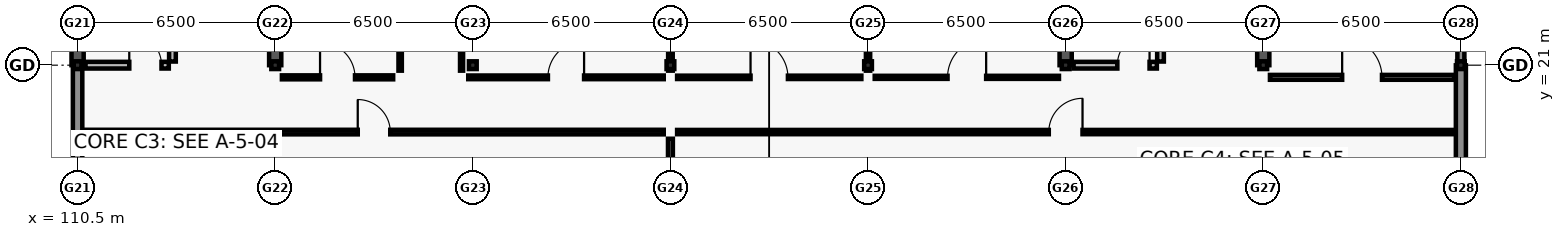
"""IFC4 building model, lengths in metres.
Left out: names, types, materials, properties, quantities, classifications, styles, units other than length and angle.
Written with IfcOpenShell. Run it as: python <this file> out.ifc"""

import sys

from ifc_helpers import new_model, si_unit, direction, frame, frame_2d, origin, origin_2d, place, context, subcontext, project, spatial, rectangle, i_section, extrude, element, fill, save


model = new_model("IFC4")
c1 = context("Model", 3, precision=1e-05, world=origin(), true_north=direction((0.0, 1.0)))
c2 = subcontext(c1, "Body", "Model", "MODEL_VIEW")
j1 = project(units=[si_unit("LENGTHUNIT", "METRE"), si_unit("PLANEANGLEUNIT", "RADIAN")], contexts=[c1])
p1 = place(None, origin())
s1 = spatial("IfcSite", under=j1, at=p1, CompositionType="ELEMENT")
p2 = place(p1, origin())
s2 = spatial("IfcBuilding", under=s1, at=p2, CompositionType="ELEMENT")
p3 = place(p2, frame((0.0, 0.0, 21.3)))
s3 = spatial("IfcBuildingStorey", under=s2, at=p3, CompositionType="ELEMENT", Elevation=21.3)
for number, where, z_axis, x_axis in (
    (1, (110.5, 21.0, 0.0), (0.0, 0.0, 1.0), (1.0, 0.0, 0.0)),
    (2, (117.0, 21.0, 0.0), (0.0, 0.0, 1.0), (1.0, 0.0, 0.0)),
    (3, (123.5, 21.0, 0.0), (0.0, 0.0, 1.0), (1.0, 0.0, 0.0)),
    (4, (130.0, 21.0, 0.0), (0.0, 0.0, 1.0), (1.0, 0.0, 0.0)),
    (5, (136.5, 21.0, 0.0), (0.0, 0.0, 1.0), (1.0, 0.0, 0.0)),
    (6, (143.0, 21.0, 0.0), (0.0, 0.0, 1.0), (1.0, 0.0, 0.0)),
    (7, (149.5, 21.0, 0.0), (0.0, 0.0, 1.0), (1.0, 0.0, 0.0)),
    (8, (156.0, 21.0, 0.0), (0.0, 0.0, 1.0), (1.0, 0.0, 0.0)),
):
    element("IfcColumn", number, at=place(p3, frame(where, z_axis=z_axis, x_axis=x_axis)), inside=s3, PredefinedType="COLUMN", context=c2, shape_type="SweptSolid", body=[
        extrude(i_section(OverallWidth=0.254, OverallDepth=0.254, WebThickness=0.009, FlangeThickness=0.014, FilletRadius=0.013, at=origin_2d()), origin(), (0.0, 0.0, 1.0), 3.9),
    ])
for number, where, z_axis, x_axis in (
    (9, (110.5, 21.0, 0.0), (0.0, 0.0, 1.0), (0.0, 1.0, 0.0)),
    (10, (117.0, 21.0, 0.0), (0.0, 0.0, 1.0), (0.0, 1.0, 0.0)),
    (11, (143.0, 21.0, 0.0), (0.0, 0.0, 1.0), (0.0, 1.0, 0.0)),
    (12, (149.5, 21.0, 0.0), (0.0, 0.0, 1.0), (0.0, 1.0, 0.0)),
):
    element("IfcWall", number, at=place(p3, frame(where, z_axis=z_axis, x_axis=x_axis)), inside=s3, PredefinedType="SHEAR", context=c2, shape_type="SweptSolid", body=[
        extrude(rectangle(XDim=6.4, YDim=0.4, at=frame_2d((3.2, 0.0))), origin(), (0.0, 0.0, 1.0), 3.66),
    ])
p4 = place(p3, frame((110.5, 14.405, 0.0), z_axis=(0.0, 0.0, 1.0), x_axis=(0.0, 1.0, 0.0)))
e13 = element("IfcWall", 13, at=p4, inside=s3, PredefinedType="SOLIDWALL", context=c2, shape_type="SweptSolid", body=[
    extrude(rectangle(XDim=6.59, YDim=0.31, at=frame_2d((3.295, 0.0))), origin(), (0.0, 0.0, 1.0), 3.02),
])
p5 = place(p4, frame((0.988, 0.0, 0.8)))
e14 = element("IfcOpeningElement", 14, at=p5, cuts=e13, PredefinedType="OPENING", context=c2, shape_type="SweptSolid", body=[
    extrude(rectangle(XDim=2.45, YDim=1.95, at=frame_2d((1.225, 0.975))), frame((0.0, 0.165, 0.0), z_axis=(0.0, -1.0, 0.0), x_axis=(1.0, 0.0, 0.0)), (0.0, 0.0, 1.0), 0.33),
])
p6 = place(p3, frame((156.0, 20.995, 0.0), z_axis=(0.0, 0.0, 1.0), x_axis=(0.0, -1.0, 0.0)))
e15 = element("IfcWall", 15, at=p6, inside=s3, PredefinedType="SOLIDWALL", context=c2, shape_type="SweptSolid", body=[
    extrude(rectangle(XDim=6.59, YDim=0.33, at=frame_2d((3.295, 0.0))), origin(), (0.0, 0.0, 1.0), 3.02),
])
p7 = place(p6, frame((3.177, 0.0, 0.72)))
e16 = element("IfcOpeningElement", 16, at=p7, cuts=e15, PredefinedType="OPENING", context=c2, shape_type="SweptSolid", body=[
    extrude(rectangle(XDim=2.4, YDim=2.1, at=frame_2d((1.2, 1.05))), frame((0.0, 0.175, 0.0), z_axis=(0.0, -1.0, 0.0), x_axis=(1.0, 0.0, 0.0)), (0.0, 0.0, 1.0), 0.35),
])
p8 = place(p3, frame((156.0, 27.595, 0.0), z_axis=(0.0, 0.0, 1.0), x_axis=(0.0, -1.0, 0.0)))
e17 = element("IfcWall", 17, at=p8, inside=s3, PredefinedType="SOLIDWALL", context=c2, shape_type="SweptSolid", body=[
    extrude(rectangle(XDim=6.59, YDim=0.23, at=frame_2d((3.295, 0.0))), origin(), (0.0, 0.0, 1.0), 3.02),
])
p9 = place(p8, frame((2.02, 0.0, 0.72)))
e18 = element("IfcOpeningElement", 18, at=p9, cuts=e17, PredefinedType="OPENING", context=c2, shape_type="SweptSolid", body=[
    extrude(rectangle(XDim=2.55, YDim=2.1, at=frame_2d((1.275, 1.05))), frame((0.0, 0.125, 0.0), z_axis=(0.0, -1.0, 0.0), x_axis=(1.0, 0.0, 0.0)), (0.0, 0.0, 1.0), 0.25),
])
p10 = place(p3, frame((113.62, 21.12, 0.0), z_axis=(0.0, 0.0, 1.0), x_axis=(0.0, 1.0, 0.0)))
e19 = element("IfcWall", 19, at=p10, inside=s3, PredefinedType="SOLIDWALL", context=c2, shape_type="SweptSolid", body=[
    extrude(rectangle(XDim=6.255, YDim=0.22, at=frame_2d((3.127, 0.0))), origin(), (0.0, 0.0, 1.0), 3.02),
])
p11 = place(p3, frame((110.76, 21.0, 0.0), z_axis=(0.0, 0.0, 1.0), x_axis=(1.0, 0.0, 0.0)))
e20 = element("IfcWall", 20, at=p11, inside=s3, PredefinedType="SOLIDWALL", context=c2, shape_type="SweptSolid", body=[
    extrude(rectangle(XDim=2.74, YDim=0.22, at=frame_2d((1.37, 0.0))), origin(), (0.0, 0.0, 1.0), 3.02),
])
p12 = place(p11, frame((1.44, 0.0, 0.0)))
e21 = element("IfcOpeningElement", 21, at=p12, cuts=e20, PredefinedType="OPENING", context=c2, shape_type="SweptSolid", body=[
    extrude(rectangle(XDim=1.06, YDim=2.1, at=frame_2d((0.53, 1.05))), frame((0.0, 0.12, 0.0), z_axis=(0.0, -1.0, 0.0), x_axis=(1.0, 0.0, 0.0)), (0.0, 0.0, 1.0), 0.24),
])
p13 = place(p3, frame((146.12, 21.12, 0.0), z_axis=(0.0, 0.0, 1.0), x_axis=(0.0, 1.0, 0.0)))
e22 = element("IfcWall", 22, at=p13, inside=s3, PredefinedType="SOLIDWALL", context=c2, shape_type="SweptSolid", body=[
    extrude(rectangle(XDim=6.255, YDim=0.22, at=frame_2d((3.127, 0.0))), origin(), (0.0, 0.0, 1.0), 3.02),
])
p14 = place(p3, frame((143.26, 21.0, 0.0), z_axis=(0.0, 0.0, 1.0), x_axis=(1.0, 0.0, 0.0)))
e23 = element("IfcWall", 23, at=p14, inside=s3, PredefinedType="SOLIDWALL", context=c2, shape_type="SweptSolid", body=[
    extrude(rectangle(XDim=2.74, YDim=0.22, at=frame_2d((1.37, 0.0))), origin(), (0.0, 0.0, 1.0), 3.02),
])
p15 = place(p14, frame((1.44, 0.0, 0.0)))
e24 = element("IfcOpeningElement", 24, at=p15, cuts=e23, PredefinedType="OPENING", context=c2, shape_type="SweptSolid", body=[
    extrude(rectangle(XDim=1.06, YDim=2.1, at=frame_2d((0.53, 1.05))), frame((0.0, 0.12, 0.0), z_axis=(0.0, -1.0, 0.0), x_axis=(1.0, 0.0, 0.0)), (0.0, 0.0, 1.0), 0.24),
])
p16 = place(p3, frame((121.11, 20.82, 0.0), z_axis=(0.0, 0.0, 1.0), x_axis=(0.0, 1.0, 0.0)))
e25 = element("IfcWall", 25, at=p16, inside=s3, PredefinedType="PARTITIONING", context=c2, shape_type="SweptSolid", body=[
    extrude(rectangle(XDim=3.16, YDim=0.11, at=frame_2d((1.58, 0.0))), origin(), (0.0, 0.0, 1.0), 3.0),
])
p17 = place(p16, frame((1.08, 0.0, 0.0)))
e26 = element("IfcOpeningElement", 26, at=p17, cuts=e25, PredefinedType="OPENING", context=c2, shape_type="SweptSolid", body=[
    extrude(rectangle(XDim=1.0, YDim=2.12, at=frame_2d((0.5, 1.06))), frame((0.0, 0.065, 0.0), z_axis=(0.0, -1.0, 0.0), x_axis=(1.0, 0.0, 0.0)), (0.0, 0.0, 1.0), 0.13),
])
p18 = place(p3, frame((123.13, 20.82, 0.0), z_axis=(0.0, 0.0, 1.0), x_axis=(0.0, 1.0, 0.0)))
e27 = element("IfcWall", 27, at=p18, inside=s3, PredefinedType="PARTITIONING", context=c2, shape_type="SweptSolid", body=[
    extrude(rectangle(XDim=3.16, YDim=0.1, at=frame_2d((1.58, 0.0))), origin(), (0.0, 0.0, 1.0), 3.0),
])
p19 = place(p18, frame((1.065, 0.0, 0.0)))
e28 = element("IfcOpeningElement", 28, at=p19, cuts=e27, PredefinedType="OPENING", context=c2, shape_type="SweptSolid", body=[
    extrude(rectangle(XDim=1.03, YDim=2.06, at=frame_2d((0.515, 1.03))), frame((0.0, 0.06, 0.0), z_axis=(0.0, -1.0, 0.0), x_axis=(1.0, 0.0, 0.0)), (0.0, 0.0, 1.0), 0.12),
])
p20 = place(p3, frame((130.0, 14.62, 0.0), z_axis=(0.0, 0.0, 1.0), x_axis=(0.0, 1.0, 0.0)))
e29 = element("IfcWall", 29, at=p20, inside=s3, PredefinedType="PARTITIONING", context=c2, shape_type="SweptSolid", body=[
    extrude(rectangle(XDim=3.96, YDim=0.16, at=frame_2d((1.98, 0.0))), origin(), (0.0, 0.0, 1.0), 3.0),
])
p21 = place(p3, frame((110.72, 18.8, 0.0), z_axis=(0.0, 0.0, 1.0), x_axis=(1.0, 0.0, 0.0)))
e30 = element("IfcWall", 30, at=p21, inside=s3, PredefinedType="PARTITIONING", context=c2, shape_type="SweptSolid", body=[
    extrude(rectangle(XDim=19.06, YDim=0.15, at=frame_2d((9.53, 0.0))), origin(), (0.0, 0.0, 1.0), 3.0),
])
p22 = place(p21, frame((8.995, 0.0, 0.0)))
e31 = element("IfcOpeningElement", 31, at=p22, cuts=e30, PredefinedType="OPENING", context=c2, shape_type="SweptSolid", body=[
    extrude(rectangle(XDim=1.07, YDim=2.08, at=frame_2d((0.535, 1.04))), frame((0.0, 0.085, 0.0), z_axis=(0.0, -1.0, 0.0), x_axis=(1.0, 0.0, 0.0)), (0.0, 0.0, 1.0), 0.17),
])
p23 = place(p3, frame((130.22, 18.8, 0.0), z_axis=(0.0, 0.0, 1.0), x_axis=(1.0, 0.0, 0.0)))
e32 = element("IfcWall", 32, at=p23, inside=s3, PredefinedType="PARTITIONING", context=c2, shape_type="SweptSolid", body=[
    extrude(rectangle(XDim=25.56, YDim=0.14, at=frame_2d((12.78, 0.0))), origin(), (0.0, 0.0, 1.0), 3.0),
])
p24 = place(p23, frame((12.225, 0.0, 0.0)))
e33 = element("IfcOpeningElement", 33, at=p24, cuts=e32, PredefinedType="OPENING", context=c2, shape_type="SweptSolid", body=[
    extrude(rectangle(XDim=1.11, YDim=2.1, at=frame_2d((0.555, 1.05))), frame((0.0, 0.08, 0.0), z_axis=(0.0, -1.0, 0.0), x_axis=(1.0, 0.0, 0.0)), (0.0, 0.0, 1.0), 0.16),
])
p25 = place(p3, frame((117.22, 20.6, 0.0), z_axis=(0.0, 0.0, 1.0), x_axis=(1.0, 0.0, 0.0)))
e34 = element("IfcWall", 34, at=p25, inside=s3, PredefinedType="PARTITIONING", context=c2, shape_type="SweptSolid", body=[
    extrude(rectangle(XDim=3.66, YDim=0.13, at=frame_2d((1.83, 0.0))), origin(), (0.0, 0.0, 1.0), 3.0),
])
p26 = place(p25, frame((1.255, 0.0, 0.0)))
e35 = element("IfcOpeningElement", 35, at=p26, cuts=e34, PredefinedType="OPENING", context=c2, shape_type="SweptSolid", body=[
    extrude(rectangle(XDim=1.15, YDim=2.12, at=frame_2d((0.575, 1.06))), frame((0.0, 0.075, 0.0), z_axis=(0.0, -1.0, 0.0), x_axis=(1.0, 0.0, 0.0)), (0.0, 0.0, 1.0), 0.15),
])
p27 = place(p3, frame((123.35, 20.6, 0.0), z_axis=(0.0, 0.0, 1.0), x_axis=(1.0, 0.0, 0.0)))
e36 = element("IfcWall", 36, at=p27, inside=s3, PredefinedType="PARTITIONING", context=c2, shape_type="SweptSolid", body=[
    extrude(rectangle(XDim=6.43, YDim=0.12, at=frame_2d((3.215, 0.0))), origin(), (0.0, 0.0, 1.0), 3.0),
])
p28 = place(p27, frame((2.62, 0.0, 0.0)))
e37 = element("IfcOpeningElement", 37, at=p28, cuts=e36, PredefinedType="OPENING", context=c2, shape_type="SweptSolid", body=[
    extrude(rectangle(XDim=1.19, YDim=2.14, at=frame_2d((0.595, 1.07))), frame((0.0, 0.07, 0.0), z_axis=(0.0, -1.0, 0.0), x_axis=(1.0, 0.0, 0.0)), (0.0, 0.0, 1.0), 0.14),
])
p29 = place(p3, frame((130.22, 20.6, 0.0), z_axis=(0.0, 0.0, 1.0), x_axis=(1.0, 0.0, 0.0)))
e38 = element("IfcWall", 38, at=p29, inside=s3, PredefinedType="PARTITIONING", context=c2, shape_type="SweptSolid", body=[
    extrude(rectangle(XDim=6.06, YDim=0.11, at=frame_2d((3.03, 0.0))), origin(), (0.0, 0.0, 1.0), 3.0),
])
p30 = place(p29, frame((2.415, 0.0, 0.0)))
e39 = element("IfcOpeningElement", 39, at=p30, cuts=e38, PredefinedType="OPENING", context=c2, shape_type="SweptSolid", body=[
    extrude(rectangle(XDim=1.23, YDim=2.08, at=frame_2d((0.615, 1.04))), frame((0.0, 0.065, 0.0), z_axis=(0.0, -1.0, 0.0), x_axis=(1.0, 0.0, 0.0)), (0.0, 0.0, 1.0), 0.13),
])
p31 = place(p3, frame((136.72, 20.6, 0.0), z_axis=(0.0, 0.0, 1.0), x_axis=(1.0, 0.0, 0.0)))
e40 = element("IfcWall", 40, at=p31, inside=s3, PredefinedType="PARTITIONING", context=c2, shape_type="SweptSolid", body=[
    extrude(rectangle(XDim=6.06, YDim=0.1, at=frame_2d((3.03, 0.0))), origin(), (0.0, 0.0, 1.0), 3.0),
])
p32 = place(p31, frame((2.395, 0.0, 0.0)))
e41 = element("IfcOpeningElement", 41, at=p32, cuts=e40, PredefinedType="OPENING", context=c2, shape_type="SweptSolid", body=[
    extrude(rectangle(XDim=1.27, YDim=2.1, at=frame_2d((0.635, 1.05))), frame((0.0, 0.06, 0.0), z_axis=(0.0, -1.0, 0.0), x_axis=(1.0, 0.0, 0.0)), (0.0, 0.0, 1.0), 0.12),
])
p33 = place(p3, frame((149.72, 20.6, 0.0), z_axis=(0.0, 0.0, 1.0), x_axis=(1.0, 0.0, 0.0)))
e42 = element("IfcWall", 42, at=p33, inside=s3, PredefinedType="PARTITIONING", context=c2, shape_type="SweptSolid", body=[
    extrude(rectangle(XDim=6.06, YDim=0.16, at=frame_2d((3.03, 0.0))), origin(), (0.0, 0.0, 1.0), 3.0),
])
p34 = place(p33, frame((2.375, 0.0, 0.0)))
e43 = element("IfcOpeningElement", 43, at=p34, cuts=e42, PredefinedType="OPENING", context=c2, shape_type="SweptSolid", body=[
    extrude(rectangle(XDim=1.31, YDim=2.14, at=frame_2d((0.655, 1.07))), frame((0.0, 0.09, 0.0), z_axis=(0.0, -1.0, 0.0), x_axis=(1.0, 0.0, 0.0)), (0.0, 0.0, 1.0), 0.18),
])
p35 = place(p3, frame((130.0, 20.82, 0.0), z_axis=(0.0, 0.0, 1.0), x_axis=(0.0, 1.0, 0.0)))
e44 = element("IfcWall", 44, at=p35, inside=s3, PredefinedType="PARTITIONING", context=c2, shape_type="SweptSolid", body=[
    extrude(rectangle(XDim=6.56, YDim=0.15, at=frame_2d((3.28, 0.0))), origin(), (0.0, 0.0, 1.0), 3.0),
])
p36 = place(p3, frame((136.5, 20.82, 0.0), z_axis=(0.0, 0.0, 1.0), x_axis=(0.0, 1.0, 0.0)))
e45 = element("IfcWall", 45, at=p36, inside=s3, PredefinedType="PARTITIONING", context=c2, shape_type="SweptSolid", body=[
    extrude(rectangle(XDim=6.56, YDim=0.14, at=frame_2d((3.28, 0.0))), origin(), (0.0, 0.0, 1.0), 3.0),
])
p37 = place(p12, origin())
e46 = element("IfcDoor", 46, at=p37, inside=s3, OperationType="SINGLE_SWING_LEFT", PredefinedType="DOOR", context=c2, shape_type="SweptSolid", body=[
    extrude(rectangle(XDim=1.06, YDim=2.1, at=frame_2d((0.53, 1.05))), frame((0.0, 0.025, 0.0), z_axis=(0.0, -1.0, 0.0), x_axis=(1.0, 0.0, 0.0)), (0.0, 0.0, 1.0), 0.05),
])
fill(e21, e46)
p38 = place(p15, origin())
e47 = element("IfcDoor", 47, at=p38, inside=s3, OperationType="SINGLE_SWING_RIGHT", PredefinedType="DOOR", context=c2, shape_type="SweptSolid", body=[
    extrude(rectangle(XDim=1.06, YDim=2.1, at=frame_2d((0.53, 1.05))), frame((0.0, 0.025, 0.0), z_axis=(0.0, -1.0, 0.0), x_axis=(1.0, 0.0, 0.0)), (0.0, 0.0, 1.0), 0.05),
])
fill(e24, e47)
p39 = place(p22, origin())
e48 = element("IfcDoor", 48, at=p39, inside=s3, OperationType="SINGLE_SWING_LEFT", PredefinedType="DOOR", context=c2, shape_type="SweptSolid", body=[
    extrude(rectangle(XDim=1.07, YDim=2.08, at=frame_2d((0.535, 1.04))), frame((0.0, 0.025, 0.0), z_axis=(0.0, -1.0, 0.0), x_axis=(1.0, 0.0, 0.0)), (0.0, 0.0, 1.0), 0.05),
])
fill(e31, e48)
p40 = place(p24, origin())
e49 = element("IfcDoor", 49, at=p40, inside=s3, OperationType="SINGLE_SWING_RIGHT", PredefinedType="DOOR", context=c2, shape_type="SweptSolid", body=[
    extrude(rectangle(XDim=1.11, YDim=2.1, at=frame_2d((0.555, 1.05))), frame((0.0, 0.025, 0.0), z_axis=(0.0, -1.0, 0.0), x_axis=(1.0, 0.0, 0.0)), (0.0, 0.0, 1.0), 0.05),
])
fill(e33, e49)
p41 = place(p26, origin())
e50 = element("IfcDoor", 50, at=p41, inside=s3, OperationType="SINGLE_SWING_LEFT", PredefinedType="DOOR", context=c2, shape_type="SweptSolid", body=[
    extrude(rectangle(XDim=1.15, YDim=2.12, at=frame_2d((0.575, 1.06))), frame((0.0, 0.025, 0.0), z_axis=(0.0, -1.0, 0.0), x_axis=(1.0, 0.0, 0.0)), (0.0, 0.0, 1.0), 0.05),
])
fill(e35, e50)
p42 = place(p28, origin())
e51 = element("IfcDoor", 51, at=p42, inside=s3, OperationType="SINGLE_SWING_RIGHT", PredefinedType="DOOR", context=c2, shape_type="SweptSolid", body=[
    extrude(rectangle(XDim=1.19, YDim=2.14, at=frame_2d((0.595, 1.07))), frame((0.0, 0.025, 0.0), z_axis=(0.0, -1.0, 0.0), x_axis=(1.0, 0.0, 0.0)), (0.0, 0.0, 1.0), 0.05),
])
fill(e37, e51)
p43 = place(p30, origin())
e52 = element("IfcDoor", 52, at=p43, inside=s3, OperationType="SINGLE_SWING_LEFT", PredefinedType="DOOR", context=c2, shape_type="SweptSolid", body=[
    extrude(rectangle(XDim=1.23, YDim=2.08, at=frame_2d((0.615, 1.04))), frame((0.0, 0.025, 0.0), z_axis=(0.0, -1.0, 0.0), x_axis=(1.0, 0.0, 0.0)), (0.0, 0.0, 1.0), 0.05),
])
fill(e39, e52)
p44 = place(p32, origin())
e53 = element("IfcDoor", 53, at=p44, inside=s3, OperationType="SINGLE_SWING_RIGHT", PredefinedType="DOOR", context=c2, shape_type="SweptSolid", body=[
    extrude(rectangle(XDim=1.27, YDim=2.1, at=frame_2d((0.635, 1.05))), frame((0.0, 0.025, 0.0), z_axis=(0.0, -1.0, 0.0), x_axis=(1.0, 0.0, 0.0)), (0.0, 0.0, 1.0), 0.05),
])
fill(e41, e53)
p45 = place(p34, origin())
e54 = element("IfcDoor", 54, at=p45, inside=s3, OperationType="SINGLE_SWING_LEFT", PredefinedType="DOOR", context=c2, shape_type="SweptSolid", body=[
    extrude(rectangle(XDim=1.31, YDim=2.14, at=frame_2d((0.655, 1.07))), frame((0.0, 0.025, 0.0), z_axis=(0.0, -1.0, 0.0), x_axis=(1.0, 0.0, 0.0)), (0.0, 0.0, 1.0), 0.05),
])
fill(e43, e54)
save(model, sys.argv[1])
